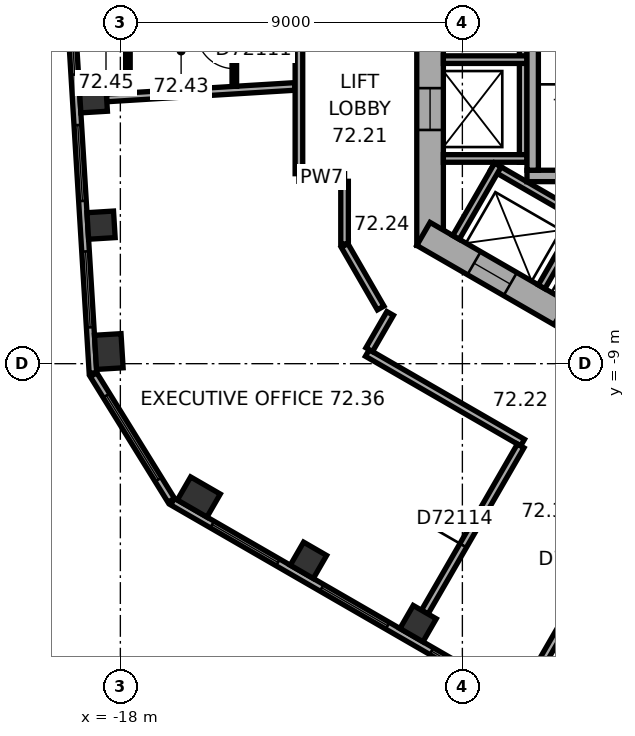
"""IFC4 building model, lengths in metres.
Left out: names, types, materials, properties, quantities, classifications, styles, units other than length and angle.
Written with IfcOpenShell. Run it as: python <this file> out.ifc"""

import sys

from ifc_helpers import new_model, si_unit, direction, frame, frame_2d, origin, origin_2d, place, context, subcontext, project, spatial, rectangle, extrude, element, fill, save


model = new_model("IFC4")
c1 = context("Model", 3, precision=1e-05, world=origin(), true_north=direction((0.0, 1.0)))
c2 = subcontext(c1, "Body", "Model", "MODEL_VIEW")
j1 = project(units=[si_unit("LENGTHUNIT", "METRE"), si_unit("PLANEANGLEUNIT", "RADIAN")], contexts=[c1])
p1 = place(None, origin())
s1 = spatial("IfcSite", under=j1, at=p1, CompositionType="ELEMENT")
p2 = place(p1, origin())
s2 = spatial("IfcBuilding", under=s1, at=p2, CompositionType="ELEMENT")
p3 = place(p2, frame((0.0, 0.0, 293.1)))
s3 = spatial("IfcBuildingStorey", under=s2, at=p3, CompositionType="ELEMENT", Elevation=293.1)
for number, where, z_axis, x_axis in (
    (1, (-18.711, -2.03, 0.0), (0.0, 0.0, 1.0), (0.061, -0.998, 0.0)),
    (2, (-18.508, -5.355, 0.0), (0.0, 0.0, 1.0), (0.061, -0.998, 0.0)),
):
    element("IfcColumn", number, at=place(p3, frame(where, z_axis=z_axis, x_axis=x_axis)), inside=s3, PredefinedType="COLUMN", context=c2, shape_type="SweptSolid", body=[
        extrude(rectangle(XDim=0.7, YDim=0.7, at=origin_2d()), origin(), (0.0, 0.0, 1.0), 3.7),
    ])
for number, where, z_axis, x_axis in (
    (3, (-18.304, -8.68, 0.0), (0.0, 0.0, 1.0), (0.061, -0.998, 0.0)),
    (4, (-15.936, -12.508, 0.0), (0.0, 0.0, 1.0), (0.866, -0.5, 0.0)),
):
    element("IfcColumn", number, at=place(p3, frame(where, z_axis=z_axis, x_axis=x_axis)), inside=s3, PredefinedType="COLUMN", context=c2, shape_type="SweptSolid", body=[
        extrude(rectangle(XDim=0.9, YDim=0.7, at=origin_2d()), origin(), (0.0, 0.0, 1.0), 3.7),
    ])
for number, where, z_axis, x_axis in (
    (5, (-13.05, -14.174, 0.0), (0.0, 0.0, 1.0), (0.866, -0.5, 0.0)),
    (6, (-10.165, -15.84, 0.0), (0.0, 0.0, 1.0), (0.866, -0.5, 0.0)),
):
    element("IfcColumn", number, at=place(p3, frame(where, z_axis=z_axis, x_axis=x_axis)), inside=s3, PredefinedType="COLUMN", context=c2, shape_type="SweptSolid", body=[
        extrude(rectangle(XDim=0.7, YDim=0.7, at=origin_2d()), origin(), (0.0, 0.0, 1.0), 3.7),
    ])
p4 = place(p3, frame((-9.85, 5.889, 0.0), z_axis=(0.0, 0.0, 1.0), x_axis=(0.0, -1.0, 0.0)))
e7 = element("IfcWall", 7, at=p4, inside=s3, PredefinedType="SHEAR", context=c2, shape_type="SweptSolid", body=[
    extrude(rectangle(XDim=11.778, YDim=0.7, at=frame_2d((5.889, 0.0))), origin(), (0.0, 0.0, 1.0), 3.7),
])
p5 = place(p4, frame((5.039, 0.0, 0.0)))
e8 = element("IfcOpeningElement", 8, at=p5, cuts=e7, PredefinedType="OPENING", context=c2, shape_type="SweptSolid", body=[
    extrude(rectangle(XDim=1.1, YDim=2.1, at=frame_2d((0.55, 1.05))), frame((0.0, 0.36, 0.0), z_axis=(0.0, -1.0, 0.0), x_axis=(1.0, 0.0, 0.0)), (0.0, 0.0, 1.0), 0.72),
])
p6 = place(p4, frame((7.639, 0.0, 0.0)))
e9 = element("IfcOpeningElement", 9, at=p6, cuts=e7, PredefinedType="OPENING", context=c2, shape_type="SweptSolid", body=[
    extrude(rectangle(XDim=1.1, YDim=2.1, at=frame_2d((0.55, 1.05))), frame((0.0, 0.36, 0.0), z_axis=(0.0, -1.0, 0.0), x_axis=(1.0, 0.0, 0.0)), (0.0, 0.0, 1.0), 0.72),
])
p7 = place(p3, frame((-10.025, -5.586, 0.0), z_axis=(0.0, 0.0, 1.0), x_axis=(0.866026453023, -0.499998182661, 0.0)))
e10 = element("IfcWall", 10, at=p7, inside=s3, PredefinedType="SHEAR", context=c2, shape_type="SweptSolid", body=[
    extrude(rectangle(XDim=11.778, YDim=0.7, at=frame_2d((5.889, 0.0))), origin(), (0.0, 0.0, 1.0), 3.7),
])
p8 = place(p7, frame((6.089, 0.0, 0.0)))
e11 = element("IfcOpeningElement", 11, at=p8, cuts=e10, PredefinedType="OPENING", context=c2, shape_type="SweptSolid", body=[
    extrude(rectangle(XDim=1.5, YDim=2.1, at=frame_2d((0.75, 1.05))), frame((0.0, 0.36, 0.0), z_axis=(0.0, -1.0, 0.0), x_axis=(1.0, 0.0, 0.0)), (0.0, 0.0, 1.0), 0.72),
])
p9 = place(p7, frame((1.539, 0.0, 0.0)))
e12 = element("IfcOpeningElement", 12, at=p9, cuts=e10, PredefinedType="OPENING", context=c2, shape_type="SweptSolid", body=[
    extrude(rectangle(XDim=1.1, YDim=2.1, at=frame_2d((0.55, 1.05))), frame((0.0, 0.36, 0.0), z_axis=(0.0, -1.0, 0.0), x_axis=(1.0, 0.0, 0.0)), (0.0, 0.0, 1.0), 0.72),
])
p10 = place(p7, frame((4.139, 0.0, 0.0)))
e13 = element("IfcOpeningElement", 13, at=p10, cuts=e10, PredefinedType="OPENING", context=c2, shape_type="SweptSolid", body=[
    extrude(rectangle(XDim=1.1, YDim=2.1, at=frame_2d((0.55, 1.05))), frame((0.0, 0.36, 0.0), z_axis=(0.0, -1.0, 0.0), x_axis=(1.0, 0.0, 0.0)), (0.0, 0.0, 1.0), 0.72),
])
p11 = place(p3, frame((-19.803, 8.454, 0.0), z_axis=(0.0, 0.0, 1.0), x_axis=(0.061036717565, -0.998135521414, 0.0)))
e14 = element("IfcWall", 14, at=p11, inside=s3, PredefinedType="STANDARD", context=c2, shape_type="SweptSolid", body=[
    extrude(rectangle(XDim=17.731, YDim=0.2, at=frame_2d((8.866, 0.0))), origin(), (0.0, 0.0, 1.0), 3.7),
])
p12 = place(p11, frame((1.202, 0.0, 0.9)))
e15 = element("IfcOpeningElement", 15, at=p12, cuts=e14, PredefinedType="OPENING", context=c2, shape_type="SweptSolid", body=[
    extrude(rectangle(XDim=2.0, YDim=2.0, at=frame_2d((1.0, 1.0))), frame((0.0, 0.11, 0.0), z_axis=(0.0, -1.0, 0.0), x_axis=(1.0, 0.0, 0.0)), (0.0, 0.0, 1.0), 0.22),
])
p13 = place(p11, frame((4.533, 0.0, 0.9)))
e16 = element("IfcOpeningElement", 16, at=p13, cuts=e14, PredefinedType="OPENING", context=c2, shape_type="SweptSolid", body=[
    extrude(rectangle(XDim=2.0, YDim=2.0, at=frame_2d((1.0, 1.0))), frame((0.0, 0.11, 0.0), z_axis=(0.0, -1.0, 0.0), x_axis=(1.0, 0.0, 0.0)), (0.0, 0.0, 1.0), 0.22),
])
p14 = place(p11, frame((7.865, 0.0, 0.9)))
e17 = element("IfcOpeningElement", 17, at=p14, cuts=e14, PredefinedType="OPENING", context=c2, shape_type="SweptSolid", body=[
    extrude(rectangle(XDim=2.0, YDim=2.0, at=frame_2d((1.0, 1.0))), frame((0.0, 0.11, 0.0), z_axis=(0.0, -1.0, 0.0), x_axis=(1.0, 0.0, 0.0)), (0.0, 0.0, 1.0), 0.22),
])
p15 = place(p11, frame((11.197, 0.0, 0.9)))
e18 = element("IfcOpeningElement", 18, at=p15, cuts=e14, PredefinedType="OPENING", context=c2, shape_type="SweptSolid", body=[
    extrude(rectangle(XDim=2.0, YDim=2.0, at=frame_2d((1.0, 1.0))), frame((0.0, 0.11, 0.0), z_axis=(0.0, -1.0, 0.0), x_axis=(1.0, 0.0, 0.0)), (0.0, 0.0, 1.0), 0.22),
])
p16 = place(p11, frame((14.528, 0.0, 0.9)))
e19 = element("IfcOpeningElement", 19, at=p16, cuts=e14, PredefinedType="OPENING", context=c2, shape_type="SweptSolid", body=[
    extrude(rectangle(XDim=2.0, YDim=2.0, at=frame_2d((1.0, 1.0))), frame((0.0, 0.11, 0.0), z_axis=(0.0, -1.0, 0.0), x_axis=(1.0, 0.0, 0.0)), (0.0, 0.0, 1.0), 0.22),
])
p17 = place(p3, frame((-18.706, -9.291, 0.0), z_axis=(0.0, 0.0, 1.0), x_axis=(0.526209683648, -0.850354848775, 0.0)))
e20 = element("IfcWall", 20, at=p17, inside=s3, PredefinedType="STANDARD", context=c2, shape_type="SweptSolid", body=[
    extrude(rectangle(XDim=3.886, YDim=0.2, at=frame_2d((1.943, 0.0))), origin(), (0.0, 0.0, 1.0), 3.7),
])
p18 = place(p17, frame((0.643, 0.0, 0.9)))
e21 = element("IfcOpeningElement", 21, at=p18, cuts=e20, PredefinedType="OPENING", context=c2, shape_type="SweptSolid", body=[
    extrude(rectangle(XDim=2.6, YDim=2.0, at=frame_2d((1.3, 1.0))), frame((0.0, 0.11, 0.0), z_axis=(0.0, -1.0, 0.0), x_axis=(1.0, 0.0, 0.0)), (0.0, 0.0, 1.0), 0.22),
])
p19 = place(p3, frame((-16.626, -12.629, 0.0), z_axis=(0.0, 0.0, 1.0), x_axis=(0.866026460444, -0.499998169808, 0.0)))
e22 = element("IfcWall", 22, at=p19, inside=s3, PredefinedType="STANDARD", context=c2, shape_type="SweptSolid", body=[
    extrude(rectangle(XDim=17.731, YDim=0.2, at=frame_2d((8.866, 0.0))), origin(), (0.0, 0.0, 1.0), 3.7),
])
p20 = place(p19, frame((1.203, 0.0, 0.9)))
e23 = element("IfcOpeningElement", 23, at=p20, cuts=e22, PredefinedType="OPENING", context=c2, shape_type="SweptSolid", body=[
    extrude(rectangle(XDim=2.0, YDim=2.0, at=frame_2d((1.0, 1.0))), frame((0.0, 0.11, 0.0), z_axis=(0.0, -1.0, 0.0), x_axis=(1.0, 0.0, 0.0)), (0.0, 0.0, 1.0), 0.22),
])
p21 = place(p19, frame((4.535, 0.0, 0.9)))
e24 = element("IfcOpeningElement", 24, at=p21, cuts=e22, PredefinedType="OPENING", context=c2, shape_type="SweptSolid", body=[
    extrude(rectangle(XDim=2.0, YDim=2.0, at=frame_2d((1.0, 1.0))), frame((0.0, 0.11, 0.0), z_axis=(0.0, -1.0, 0.0), x_axis=(1.0, 0.0, 0.0)), (0.0, 0.0, 1.0), 0.22),
])
p22 = place(p19, frame((7.867, 0.0, 0.9)))
e25 = element("IfcOpeningElement", 25, at=p22, cuts=e22, PredefinedType="OPENING", context=c2, shape_type="SweptSolid", body=[
    extrude(rectangle(XDim=2.0, YDim=2.0, at=frame_2d((1.0, 1.0))), frame((0.0, 0.11, 0.0), z_axis=(0.0, -1.0, 0.0), x_axis=(1.0, 0.0, 0.0)), (0.0, 0.0, 1.0), 0.22),
])
p23 = place(p19, frame((11.198, 0.0, 0.9)))
e26 = element("IfcOpeningElement", 26, at=p23, cuts=e22, PredefinedType="OPENING", context=c2, shape_type="SweptSolid", body=[
    extrude(rectangle(XDim=2.0, YDim=2.0, at=frame_2d((1.0, 1.0))), frame((0.0, 0.11, 0.0), z_axis=(0.0, -1.0, 0.0), x_axis=(1.0, 0.0, 0.0)), (0.0, 0.0, 1.0), 0.22),
])
p24 = place(p19, frame((14.53, 0.0, 0.9)))
e27 = element("IfcOpeningElement", 27, at=p24, cuts=e22, PredefinedType="OPENING", context=c2, shape_type="SweptSolid", body=[
    extrude(rectangle(XDim=2.0, YDim=2.0, at=frame_2d((1.0, 1.0))), frame((0.0, 0.11, 0.0), z_axis=(0.0, -1.0, 0.0), x_axis=(1.0, 0.0, 0.0)), (0.0, 0.0, 1.0), 0.22),
])
p25 = place(p3, frame((-7.4, 4.3, 0.0), z_axis=(0.0, 0.0, 1.0), x_axis=(0.0, -1.0, 0.0)))
e28 = element("IfcWall", 28, at=p25, inside=s3, PredefinedType="PARTITIONING", context=c2, shape_type="SweptSolid", body=[
    extrude(rectangle(XDim=8.0, YDim=0.2, at=frame_2d((4.0, 0.0))), origin(), (0.0, 0.0, 1.0), 3.42),
])
for number, where, z_axis, x_axis in (
    (29, (-7.3, -1.0, 0.0), (0.0, 0.0, 1.0), (-1.0, 0.0, 0.0)),
    (30, (-7.3, -3.6, 0.0), (0.0, 0.0, 1.0), (-1.0, 0.0, 0.0)),
):
    element("IfcWall", number, at=place(p3, frame(where, z_axis=z_axis, x_axis=x_axis)), inside=s3, PredefinedType="PARTITIONING", context=c2, shape_type="SweptSolid", body=[
        extrude(rectangle(XDim=2.2, YDim=0.2, at=frame_2d((1.1, 0.0))), origin(), (0.0, 0.0, 1.0), 3.42),
    ])
p26 = place(p3, frame((-8.203, -3.809, 0.0), z_axis=(0.0, 0.0, 1.0), x_axis=(0.866028230842, -0.499995103361, 0.0)))
e31 = element("IfcWall", 31, at=p26, inside=s3, PredefinedType="PARTITIONING", context=c2, shape_type="SweptSolid", body=[
    extrude(rectangle(XDim=5.4, YDim=0.2, at=frame_2d((2.7, 0.0))), origin(), (0.0, 0.0, 1.0), 3.42),
])
for number, where, z_axis, x_axis in (
    (32, (-8.067, -3.772, 0.0), (0.0, 0.0, 1.0), (-0.5, -0.866, 0.0)),
    (33, (-5.815, -5.072, 0.0), (0.0, 0.0, 1.0), (-0.5, -0.866, 0.0)),
):
    element("IfcWall", number, at=place(p3, frame(where, z_axis=z_axis, x_axis=x_axis)), inside=s3, PredefinedType="PARTITIONING", context=c2, shape_type="SweptSolid", body=[
        extrude(rectangle(XDim=2.2, YDim=0.2, at=frame_2d((1.1, 0.0))), origin(), (0.0, 0.0, 1.0), 3.42),
    ])
p27 = place(p3, frame((-2.6, -4.06, 0.0), z_axis=(0.0, 0.0, 1.0), x_axis=(-1.0, 0.0, 0.0)))
e34 = element("IfcWall", 34, at=p27, inside=s3, PredefinedType="SHEAR", context=c2, shape_type="SweptSolid", body=[
    extrude(rectangle(XDim=4.7, YDim=0.3, at=frame_2d((2.35, 0.0))), origin(), (0.0, 0.0, 1.0), 3.42),
])
p28 = place(p3, frame((-7.15, 3.15, 0.0), z_axis=(0.0, 0.0, 1.0), x_axis=(0.0, -1.0, 0.0)))
e35 = element("IfcWall", 35, at=p28, inside=s3, PredefinedType="SHEAR", context=c2, shape_type="SweptSolid", body=[
    extrude(rectangle(XDim=7.06, YDim=0.3, at=frame_2d((3.53, 0.0))), origin(), (0.0, 0.0, 1.0), 3.42),
])
p29 = place(p3, frame((-18.362, -2.008, 0.0), z_axis=(0.0, 0.0, 1.0), x_axis=(0.998135748374, 0.061033005966, 0.0)))
e36 = element("IfcWall", 36, at=p29, inside=s3, PredefinedType="PARTITIONING", context=c2, shape_type="SweptSolid", body=[
    extrude(rectangle(XDim=4.96, YDim=0.2, at=frame_2d((2.48, 0.0))), origin(), (0.0, 0.0, 1.0), 3.42),
])
p30 = place(p3, frame((-17.801, 0.226, 0.0), z_axis=(0.0, 0.0, 1.0), x_axis=(0.0, -1.0, 0.0)))
e37 = element("IfcWall", 37, at=p30, inside=s3, PredefinedType="PARTITIONING", context=c2, shape_type="SweptSolid", body=[
    extrude(rectangle(XDim=2.1, YDim=0.12, at=frame_2d((1.05, 0.0))), origin(), (0.0, 0.0, 1.0), 3.42),
])
p31 = place(p3, frame((-15.001, 4.773, 0.0), z_axis=(0.0, 0.0, 1.0), x_axis=(0.0, -1.0, 0.0)))
e38 = element("IfcWall", 38, at=p31, inside=s3, PredefinedType="PARTITIONING", context=c2, shape_type="SweptSolid", body=[
    extrude(rectangle(XDim=6.476, YDim=0.12, at=frame_2d((3.238, 0.0))), origin(), (0.0, 0.0, 1.0), 3.42),
])
p32 = place(p31, frame((5.011, 0.0, 0.0)))
e39 = element("IfcOpeningElement", 39, at=p32, cuts=e38, PredefinedType="OPENING", context=c2, shape_type="SweptSolid", body=[
    extrude(rectangle(XDim=1.0, YDim=2.1, at=frame_2d((0.5, 1.05))), frame((0.0, 0.07, 0.0), z_axis=(0.0, -1.0, 0.0), x_axis=(1.0, 0.0, 0.0)), (0.0, 0.0, 1.0), 0.14),
])
p33 = place(p31, frame((0.8, 0.0, 0.0)))
e40 = element("IfcOpeningElement", 40, at=p33, cuts=e38, PredefinedType="OPENING", context=c2, shape_type="SweptSolid", body=[
    extrude(rectangle(XDim=0.9, YDim=2.1, at=frame_2d((0.45, 1.05))), frame((0.0, 0.07, 0.0), z_axis=(0.0, -1.0, 0.0), x_axis=(1.0, 0.0, 0.0)), (0.0, 0.0, 1.0), 0.14),
])
p34 = place(p31, frame((3.073, 0.0, 0.0)))
e41 = element("IfcOpeningElement", 41, at=p34, cuts=e38, PredefinedType="OPENING", context=c2, shape_type="SweptSolid", body=[
    extrude(rectangle(XDim=0.9, YDim=2.1, at=frame_2d((0.45, 1.05))), frame((0.0, 0.07, 0.0), z_axis=(0.0, -1.0, 0.0), x_axis=(1.0, 0.0, 0.0)), (0.0, 0.0, 1.0), 0.14),
])
p35 = place(p3, frame((-13.301, -4.101, 0.0), z_axis=(0.0, 0.0, 1.0), x_axis=(1.0, 0.0, 0.0)))
e42 = element("IfcWall", 42, at=p35, inside=s3, PredefinedType="PARTITIONING", context=c2, shape_type="SweptSolid", body=[
    extrude(rectangle(XDim=1.201, YDim=0.2, at=frame_2d((0.601, 0.0))), origin(), (0.0, 0.0, 1.0), 3.42),
])
p36 = place(p3, frame((-13.301, 2.101, 0.0), z_axis=(0.0, 0.0, 1.0), x_axis=(0.0, -1.0, 0.0)))
e43 = element("IfcWall", 43, at=p36, inside=s3, PredefinedType="PARTITIONING", context=c2, shape_type="SweptSolid", body=[
    extrude(rectangle(XDim=6.102, YDim=0.2, at=frame_2d((3.051, 0.0))), origin(), (0.0, 0.0, 1.0), 3.42),
])
p37 = place(p36, frame((1.4, 0.0, 0.0)))
e44 = element("IfcOpeningElement", 44, at=p37, cuts=e43, PredefinedType="OPENING", context=c2, shape_type="SweptSolid", body=[
    extrude(rectangle(XDim=1.0, YDim=2.1, at=frame_2d((0.5, 1.05))), frame((0.0, 0.11, 0.0), z_axis=(0.0, -1.0, 0.0), x_axis=(1.0, 0.0, 0.0)), (0.0, 0.0, 1.0), 0.22),
])
p38 = place(p3, frame((-12.1, -5.889, 0.0), z_axis=(0.0, 0.0, 1.0), x_axis=(0.500063520245, -0.865988727248, 0.0)))
e45 = element("IfcWall", 45, at=p38, inside=s3, PredefinedType="PARTITIONING", context=c2, shape_type="SweptSolid", body=[
    extrude(rectangle(XDim=1.9, YDim=0.2, at=frame_2d((0.95, 0.0))), origin(), (0.0, 0.0, 1.0), 3.42),
])
p39 = place(p3, frame((-12.1, -4.201, 0.0), z_axis=(0.0, 0.0, 1.0), x_axis=(0.0, -1.0, 0.0)))
e46 = element("IfcWall", 46, at=p39, inside=s3, PredefinedType="PARTITIONING", context=c2, shape_type="SweptSolid", body=[
    extrude(rectangle(XDim=1.648, YDim=0.2, at=frame_2d((0.824, 0.0))), origin(), (0.0, 0.0, 1.0), 3.42),
])
p40 = place(p3, frame((-11.501, -8.719, 0.0), z_axis=(0.0, 0.0, 1.0), x_axis=(0.866024434742, -0.500001678427, 0.0)))
e47 = element("IfcWall", 47, at=p40, inside=s3, PredefinedType="PARTITIONING", context=c2, shape_type="SweptSolid", body=[
    extrude(rectangle(XDim=4.718, YDim=0.2, at=frame_2d((2.359, 0.0))), origin(), (0.0, 0.0, 1.0), 3.42),
])
p41 = place(p3, frame((-10.901, -7.678, 0.0), z_axis=(0.0, 0.0, 1.0), x_axis=(-0.500074377092, -0.865982457891, 0.0)))
e48 = element("IfcWall", 48, at=p41, inside=s3, PredefinedType="PARTITIONING", context=c2, shape_type="SweptSolid", body=[
    extrude(rectangle(XDim=1.101, YDim=0.2, at=frame_2d((0.55, 0.0))), origin(), (0.0, 0.0, 1.0), 3.42),
])
p42 = place(p3, frame((-9.99, -15.537, 0.0), z_axis=(0.0, 0.0, 1.0), x_axis=(0.499966611936, 0.866044679534, 0.0)))
e49 = element("IfcWall", 49, at=p42, inside=s3, PredefinedType="PARTITIONING", context=c2, shape_type="SweptSolid", body=[
    extrude(rectangle(XDim=5.049, YDim=0.2, at=frame_2d((2.524, 0.0))), origin(), (0.0, 0.0, 1.0), 2.87),
])
p43 = place(p42, frame((2.024, 0.0, 0.0)))
e50 = element("IfcOpeningElement", 50, at=p43, cuts=e49, PredefinedType="OPENING", context=c2, shape_type="SweptSolid", body=[
    extrude(rectangle(XDim=1.0, YDim=2.1, at=frame_2d((0.5, 1.05))), frame((0.0, 0.11, 0.0), z_axis=(0.0, -1.0, 0.0), x_axis=(1.0, 0.0, 0.0)), (0.0, 0.0, 1.0), 0.22),
])
p44 = place(p3, frame((-7.105, -17.202, 0.0), z_axis=(0.0, 0.0, 1.0), x_axis=(0.499988692146, 0.866031932279, 0.0)))
e51 = element("IfcWall", 51, at=p44, inside=s3, PredefinedType="PARTITIONING", context=c2, shape_type="SweptSolid", body=[
    extrude(rectangle(XDim=6.35, YDim=0.2, at=frame_2d((3.175, 0.0))), origin(), (0.0, 0.0, 1.0), 3.42),
])
p45 = place(p44, frame((2.675, 0.0, 0.0)))
e52 = element("IfcOpeningElement", 52, at=p45, cuts=e51, PredefinedType="OPENING", context=c2, shape_type="SweptSolid", body=[
    extrude(rectangle(XDim=1.0, YDim=2.1, at=frame_2d((0.5, 1.05))), frame((0.0, 0.11, 0.0), z_axis=(0.0, -1.0, 0.0), x_axis=(1.0, 0.0, 0.0)), (0.0, 0.0, 1.0), 0.22),
])
p46 = place(p14, origin())
e53 = element("IfcWindow", 53, at=p46, inside=s3, PartitioningType="SINGLE_PANEL", PredefinedType="WINDOW", context=c2, shape_type="SweptSolid", body=[
    extrude(rectangle(XDim=2.0, YDim=2.0, at=frame_2d((1.0, 1.0))), frame((0.0, 0.03, 0.0), z_axis=(0.0, -1.0, 0.0), x_axis=(1.0, 0.0, 0.0)), (0.0, 0.0, 1.0), 0.06),
])
fill(e17, e53)
p47 = place(p15, origin())
e54 = element("IfcWindow", 54, at=p47, inside=s3, PartitioningType="SINGLE_PANEL", PredefinedType="WINDOW", context=c2, shape_type="SweptSolid", body=[
    extrude(rectangle(XDim=2.0, YDim=2.0, at=frame_2d((1.0, 1.0))), frame((0.0, 0.03, 0.0), z_axis=(0.0, -1.0, 0.0), x_axis=(1.0, 0.0, 0.0)), (0.0, 0.0, 1.0), 0.06),
])
fill(e18, e54)
p48 = place(p16, origin())
e55 = element("IfcWindow", 55, at=p48, inside=s3, PartitioningType="SINGLE_PANEL", PredefinedType="WINDOW", context=c2, shape_type="SweptSolid", body=[
    extrude(rectangle(XDim=2.0, YDim=2.0, at=frame_2d((1.0, 1.0))), frame((0.0, 0.03, 0.0), z_axis=(0.0, -1.0, 0.0), x_axis=(1.0, 0.0, 0.0)), (0.0, 0.0, 1.0), 0.06),
])
fill(e19, e55)
p49 = place(p18, origin())
e56 = element("IfcWindow", 56, at=p49, inside=s3, PartitioningType="SINGLE_PANEL", PredefinedType="WINDOW", context=c2, shape_type="SweptSolid", body=[
    extrude(rectangle(XDim=2.6, YDim=2.0, at=frame_2d((1.3, 1.0))), frame((0.0, 0.03, 0.0), z_axis=(0.0, -1.0, 0.0), x_axis=(1.0, 0.0, 0.0)), (0.0, 0.0, 1.0), 0.06),
])
fill(e21, e56)
p50 = place(p20, origin())
e57 = element("IfcWindow", 57, at=p50, inside=s3, PartitioningType="SINGLE_PANEL", PredefinedType="WINDOW", context=c2, shape_type="SweptSolid", body=[
    extrude(rectangle(XDim=2.0, YDim=2.0, at=frame_2d((1.0, 1.0))), frame((0.0, 0.03, 0.0), z_axis=(0.0, -1.0, 0.0), x_axis=(1.0, 0.0, 0.0)), (0.0, 0.0, 1.0), 0.06),
])
fill(e23, e57)
p51 = place(p21, origin())
e58 = element("IfcWindow", 58, at=p51, inside=s3, PartitioningType="SINGLE_PANEL", PredefinedType="WINDOW", context=c2, shape_type="SweptSolid", body=[
    extrude(rectangle(XDim=2.0, YDim=2.0, at=frame_2d((1.0, 1.0))), frame((0.0, 0.03, 0.0), z_axis=(0.0, -1.0, 0.0), x_axis=(1.0, 0.0, 0.0)), (0.0, 0.0, 1.0), 0.06),
])
fill(e24, e58)
p52 = place(p22, origin())
e59 = element("IfcWindow", 59, at=p52, inside=s3, PartitioningType="SINGLE_PANEL", PredefinedType="WINDOW", context=c2, shape_type="SweptSolid", body=[
    extrude(rectangle(XDim=2.0, YDim=2.0, at=frame_2d((1.0, 1.0))), frame((0.0, 0.03, 0.0), z_axis=(0.0, -1.0, 0.0), x_axis=(1.0, 0.0, 0.0)), (0.0, 0.0, 1.0), 0.06),
])
fill(e25, e59)
p53 = place(p6, origin())
e60 = element("IfcDoor", 60, at=p53, inside=s3, OperationType="DOUBLE_DOOR_SLIDING", PredefinedType="DOOR", context=c2, shape_type="SweptSolid", body=[
    extrude(rectangle(XDim=1.1, YDim=2.1, at=frame_2d((0.55, 1.05))), frame((0.0, 0.025, 0.0), z_axis=(0.0, -1.0, 0.0), x_axis=(1.0, 0.0, 0.0)), (0.0, 0.0, 1.0), 0.05),
])
fill(e9, e60)
p54 = place(p9, origin())
e61 = element("IfcDoor", 61, at=p54, inside=s3, OperationType="DOUBLE_DOOR_SLIDING", PredefinedType="DOOR", context=c2, shape_type="SweptSolid", body=[
    extrude(rectangle(XDim=1.1, YDim=2.1, at=frame_2d((0.55, 1.05))), frame((0.0, 0.025, 0.0), z_axis=(0.0, -1.0, 0.0), x_axis=(1.0, 0.0, 0.0)), (0.0, 0.0, 1.0), 0.05),
])
fill(e12, e61)
p55 = place(p32, origin())
e62 = element("IfcDoor", 62, at=p55, inside=s3, OperationType="SINGLE_SWING_LEFT", PredefinedType="DOOR", context=c2, shape_type="SweptSolid", body=[
    extrude(rectangle(XDim=1.0, YDim=2.1, at=frame_2d((0.5, 1.05))), frame((0.0, 0.025, 0.0), z_axis=(0.0, -1.0, 0.0), x_axis=(1.0, 0.0, 0.0)), (0.0, 0.0, 1.0), 0.05),
])
fill(e39, e62)
p56 = place(p43, origin())
e63 = element("IfcDoor", 63, at=p56, inside=s3, OperationType="SINGLE_SWING_LEFT", PredefinedType="DOOR", context=c2, shape_type="SweptSolid", body=[
    extrude(rectangle(XDim=1.0, YDim=2.1, at=frame_2d((0.5, 1.05))), frame((0.0, 0.025, 0.0), z_axis=(0.0, -1.0, 0.0), x_axis=(1.0, 0.0, 0.0)), (0.0, 0.0, 1.0), 0.05),
])
fill(e50, e63)
save(model, sys.argv[1])
